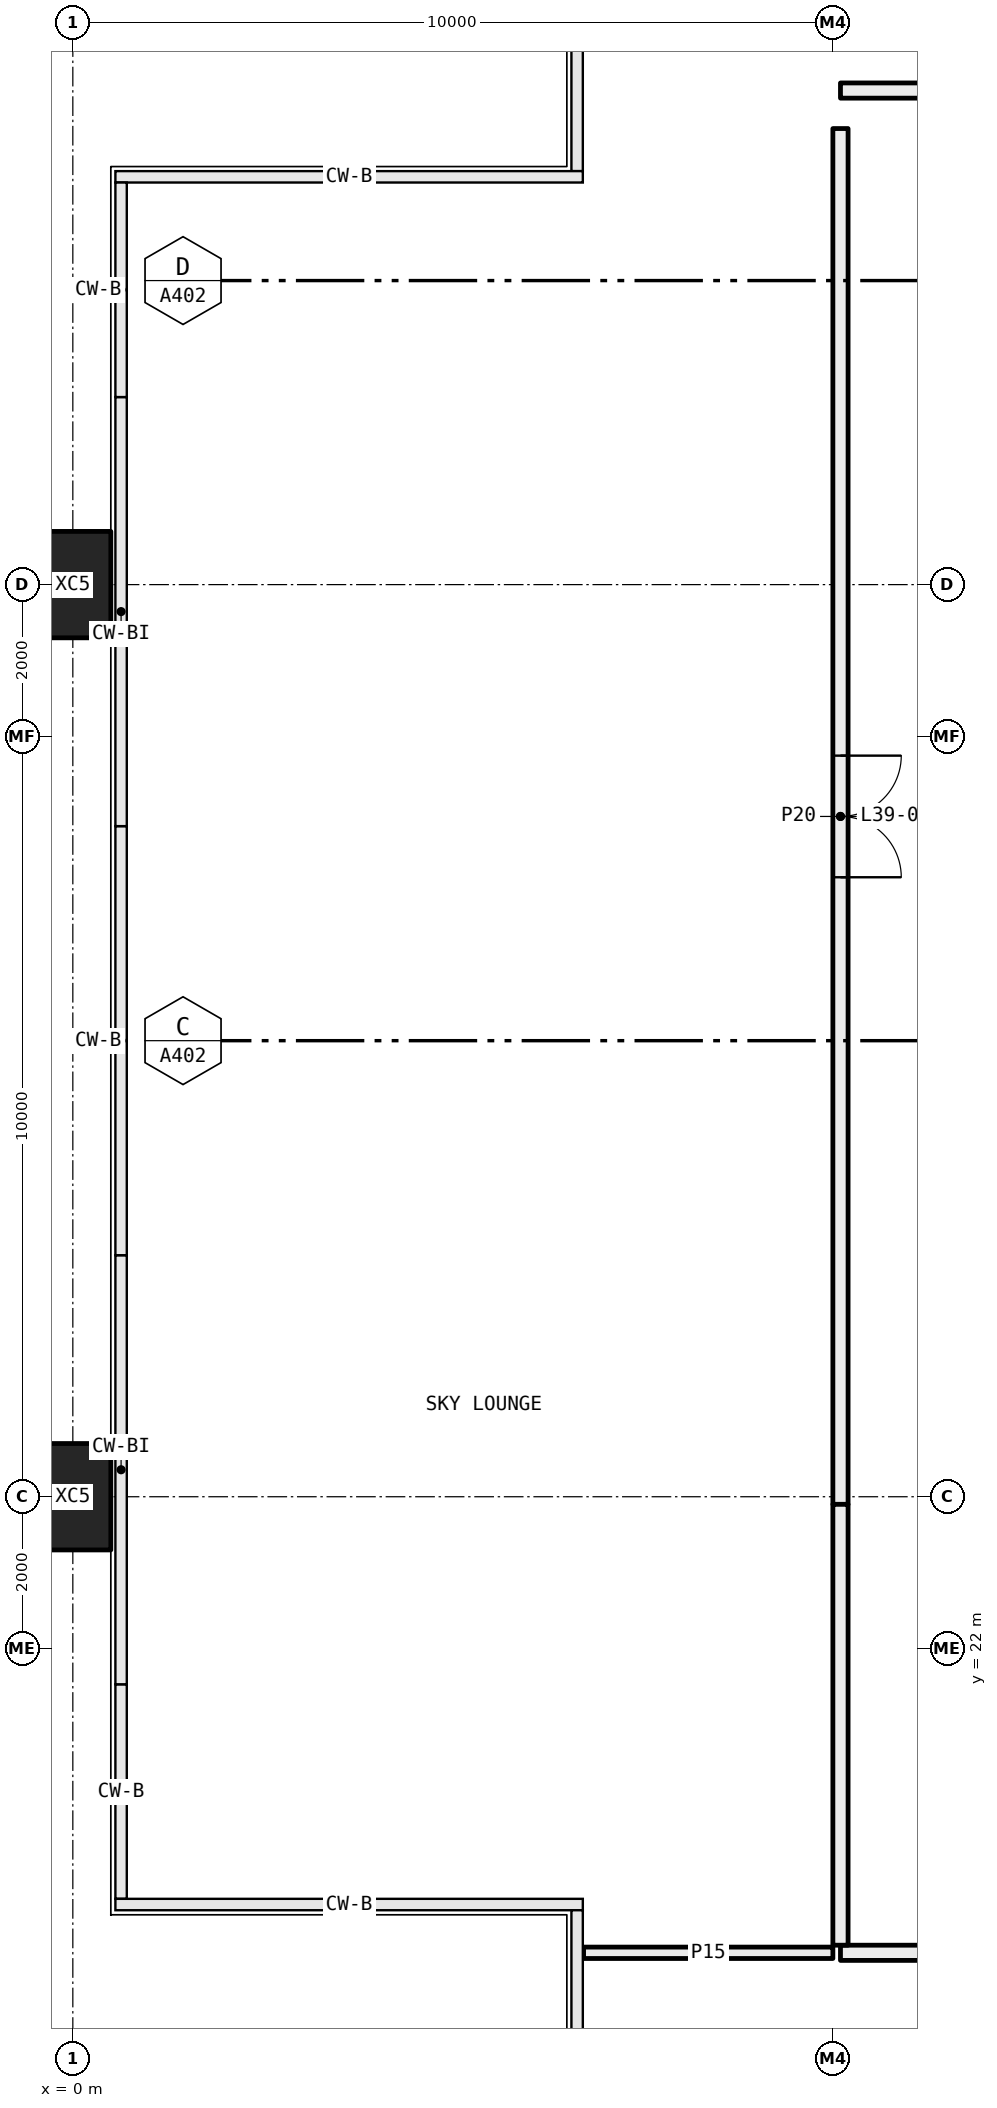
"""IFC4 building model, lengths in metres.
Left out: names, types, materials, properties, quantities, classifications, styles, units other than length and angle.
Written with IfcOpenShell. Run it as: python <this file> out.ifc"""

import sys

from ifc_helpers import new_model, si_unit, direction, frame, frame_2d, origin, origin_2d, place, context, subcontext, project, spatial, rectangle, hollow_rectangle, extrude, element, fill, save


model = new_model("IFC4")
c1 = context("Model", 3, precision=1e-05, world=origin(), true_north=direction((0.0, 1.0)))
c2 = subcontext(c1, "Body", "Model", "MODEL_VIEW")
j1 = project(units=[si_unit("LENGTHUNIT", "METRE"), si_unit("PLANEANGLEUNIT", "RADIAN")], contexts=[c1])
p1 = place(None, origin())
s1 = spatial("IfcSite", under=j1, at=p1, CompositionType="ELEMENT")
p2 = place(p1, origin())
s2 = spatial("IfcBuilding", under=s1, at=p2, CompositionType="ELEMENT")
p3 = place(p2, frame((0.0, 0.0, 148.35)))
s3 = spatial("IfcBuildingStorey", under=s2, at=p3, CompositionType="ELEMENT", Elevation=148.35)
for number, where, z_axis, x_axis in (
    (1, (0.0, 24.0, -0.4), (0.0, 0.0, 1.0), (0.0, 1.0, 0.0)),
    (2, (0.0, 36.0, -0.4), (0.0, 0.0, 1.0), (0.0, 1.0, 0.0)),
):
    element("IfcColumn", number, at=place(p3, frame(where, z_axis=z_axis, x_axis=x_axis)), inside=s3, PredefinedType="COLUMN", context=c2, shape_type="SweptSolid", body=[
        extrude(hollow_rectangle(XDim=1.4, YDim=1.0, WallThickness=0.055, at=origin_2d()), origin(), (0.0, 0.0, 1.0), 5.4),
    ])
p4 = place(p3, frame((10.1, 18.0, 0.0), z_axis=(0.0, 0.0, 1.0), x_axis=(1.0, 0.0, 0.0)))
e3 = element("IfcWall", 3, at=p4, inside=s3, PredefinedType="PARTITIONING", context=c2, shape_type="SweptSolid", body=[
    extrude(rectangle(XDim=13.9, YDim=0.2, at=frame_2d((6.95, 0.0))), origin(), (0.0, 0.0, 1.0), 5.0),
])
p5 = place(p4, frame((6.15, 0.0, 0.0)))
e4 = element("IfcOpeningElement", 4, at=p5, cuts=e3, PredefinedType="OPENING", context=c2, shape_type="SweptSolid", body=[
    extrude(rectangle(XDim=1.6, YDim=2.1, at=frame_2d((0.8, 1.05))), frame((0.0, 0.11, 0.0), z_axis=(0.0, -1.0, 0.0), x_axis=(1.0, 0.0, 0.0)), (0.0, 0.0, 1.0), 0.22),
])
p6 = place(p3, frame((18.0, 42.5, 0.0), z_axis=(0.0, 0.0, 1.0), x_axis=(-1.0, 0.0, 0.0)))
e5 = element("IfcWall", 5, at=p6, inside=s3, PredefinedType="PARTITIONING", context=c2, shape_type="SweptSolid", body=[
    extrude(rectangle(XDim=7.9, YDim=0.2, at=frame_2d((3.95, 0.0))), origin(), (0.0, 0.0, 1.0), 5.0),
])
p7 = place(p6, frame((3.5, 0.0, 0.0)))
e6 = element("IfcOpeningElement", 6, at=p7, cuts=e5, PredefinedType="OPENING", context=c2, shape_type="SweptSolid", body=[
    extrude(rectangle(XDim=0.9, YDim=2.1, at=frame_2d((0.45, 1.05))), frame((0.0, 0.11, 0.0), z_axis=(0.0, -1.0, 0.0), x_axis=(1.0, 0.0, 0.0)), (0.0, 0.0, 1.0), 0.22),
])
p8 = place(p3, frame((10.1, 42.0, 0.0), z_axis=(0.0, 0.0, 1.0), x_axis=(0.0, -1.0, 0.0)))
e7 = element("IfcWall", 7, at=p8, inside=s3, PredefinedType="PARTITIONING", context=c2, shape_type="SweptSolid", body=[
    extrude(rectangle(XDim=18.1, YDim=0.2, at=frame_2d((9.05, 0.0))), origin(), (0.0, 0.0, 1.0), 4.4),
])
p9 = place(p8, frame((8.25, 0.0, 0.0)))
e8 = element("IfcOpeningElement", 8, at=p9, cuts=e7, PredefinedType="OPENING", context=c2, shape_type="SweptSolid", body=[
    extrude(rectangle(XDim=1.6, YDim=2.1, at=frame_2d((0.8, 1.05))), frame((0.0, 0.11, 0.0), z_axis=(0.0, -1.0, 0.0), x_axis=(1.0, 0.0, 0.0)), (0.0, 0.0, 1.0), 0.22),
])
p10 = place(p3, frame((10.1, 23.9, 0.0), z_axis=(0.0, 0.0, 1.0), x_axis=(0.0, -1.0, 0.0)))
e9 = element("IfcWall", 9, at=p10, inside=s3, PredefinedType="PARTITIONING", context=c2, shape_type="SweptSolid", body=[
    extrude(rectangle(XDim=5.8, YDim=0.2, at=frame_2d((2.9, 0.0))), origin(), (0.0, 0.0, 1.0), 5.0),
])
p11 = place(p3, frame((10.0, 18.0, 0.0), z_axis=(0.0, 0.0, 1.0), x_axis=(-1.0, 0.0, 0.0)))
e10 = element("IfcWall", 10, at=p11, inside=s3, PredefinedType="PARTITIONING", context=c2, shape_type="SweptSolid", body=[
    extrude(rectangle(XDim=3.28, YDim=0.15, at=frame_2d((1.64, 0.0))), origin(), (0.0, 0.0, 1.0), 5.0),
])
p12 = place(p9, origin())
e11 = element("IfcDoor", 11, at=p12, inside=s3, OperationType="DOUBLE_DOOR_SINGLE_SWING", PredefinedType="DOOR", context=c2, shape_type="SweptSolid", body=[
    extrude(rectangle(XDim=1.6, YDim=2.1, at=frame_2d((0.8, 1.05))), frame((0.0, 0.025, 0.0), z_axis=(0.0, -1.0, 0.0), x_axis=(1.0, 0.0, 0.0)), (0.0, 0.0, 1.0), 0.05),
])
fill(e8, e11)
save(model, sys.argv[1])
